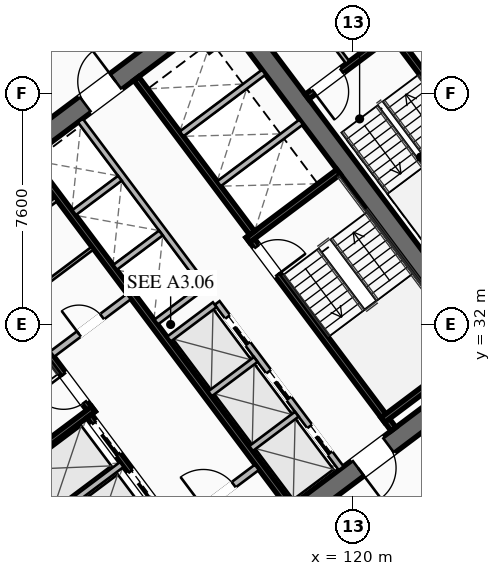
"""IFC4 building model, lengths in metres.
Left out: names, types, materials, properties, quantities, classifications, styles, units other than length and angle.
Written with IfcOpenShell. Run it as: python <this file> out.ifc"""

import sys

from ifc_helpers import new_model, si_unit, direction, frame, frame_2d, origin, place, context, subcontext, project, spatial, rectangle, extrude, element, fill, save


model = new_model("IFC4")
c1 = context("Model", 3, precision=1e-05, world=origin(), true_north=direction((0.0, 1.0)))
c2 = subcontext(c1, "Body", "Model", "MODEL_VIEW")
j1 = project(units=[si_unit("LENGTHUNIT", "METRE"), si_unit("PLANEANGLEUNIT", "RADIAN")], contexts=[c1])
p1 = place(None, origin())
s1 = spatial("IfcSite", under=j1, at=p1, CompositionType="ELEMENT")
p2 = place(p1, origin())
s2 = spatial("IfcBuilding", under=s1, at=p2, CompositionType="ELEMENT")
p3 = place(p2, frame((0.0, 0.0, 56.55)))
s3 = spatial("IfcBuildingStorey", under=s2, at=p3, CompositionType="ELEMENT", Elevation=56.55)
for number, where, z_axis, x_axis in (
    (1, (112.476, 21.107, 0.0), (0.0, 0.0, 1.0), (-0.6, 0.8, 0.0)),
    (2, (115.524, 42.893, 0.0), (0.0, 0.0, 1.0), (0.6, -0.8, 0.0)),
):
    element("IfcWall", number, at=place(p3, frame(where, z_axis=z_axis, x_axis=x_axis)), inside=s3, PredefinedType="SHEAR", context=c2, shape_type="SweptSolid", body=[
        extrude(rectangle(XDim=15.6, YDim=0.65, at=frame_2d((7.8, 0.0))), origin(), (0.0, 0.0, 1.0), 3.55),
    ])
p4 = place(p3, frame((124.429, 30.478, 0.0), z_axis=(0.0, 0.0, 1.0), x_axis=(-0.799998028465, -0.600002628705, 0.0)))
e3 = element("IfcWall", 3, at=p4, inside=s3, PredefinedType="SHEAR", context=c2, shape_type="SweptSolid", body=[
    extrude(rectangle(XDim=14.86, YDim=0.65, at=frame_2d((7.43, 0.0))), origin(), (0.0, 0.0, 1.0), 3.55),
])
p5 = place(p4, frame((9.13, 0.0, 0.0)))
e4 = element("IfcOpeningElement", 4, at=p5, cuts=e3, PredefinedType="OPENING", context=c2, shape_type="SweptSolid", body=[
    extrude(rectangle(XDim=1.25, YDim=2.25, at=frame_2d((0.625, 1.125))), frame((0.0, 0.335, 0.0), z_axis=(0.0, -1.0, 0.0), x_axis=(1.0, 0.0, 0.0)), (0.0, 0.0, 1.0), 0.67),
])
p6 = place(p4, frame((4.08, 0.0, 0.0)))
e5 = element("IfcOpeningElement", 5, at=p6, cuts=e3, PredefinedType="OPENING", context=c2, shape_type="SweptSolid", body=[
    extrude(rectangle(XDim=1.25, YDim=2.25, at=frame_2d((0.625, 1.125))), frame((0.0, 0.335, 0.0), z_axis=(0.0, -1.0, 0.0), x_axis=(1.0, 0.0, 0.0)), (0.0, 0.0, 1.0), 0.67),
])
p7 = place(p3, frame((103.571, 33.522, 0.0), z_axis=(0.0, 0.0, 1.0), x_axis=(0.799998028465, 0.600002628705, 0.0)))
e6 = element("IfcWall", 6, at=p7, inside=s3, PredefinedType="SHEAR", context=c2, shape_type="SweptSolid", body=[
    extrude(rectangle(XDim=14.86, YDim=0.65, at=frame_2d((7.43, 0.0))), origin(), (0.0, 0.0, 1.0), 3.55),
])
p8 = place(p7, frame((4.48, 0.0, 0.0)))
e7 = element("IfcOpeningElement", 7, at=p8, cuts=e6, PredefinedType="OPENING", context=c2, shape_type="SweptSolid", body=[
    extrude(rectangle(XDim=1.25, YDim=2.25, at=frame_2d((0.625, 1.125))), frame((0.0, 0.335, 0.0), z_axis=(0.0, -1.0, 0.0), x_axis=(1.0, 0.0, 0.0)), (0.0, 0.0, 1.0), 0.67),
])
p9 = place(p7, frame((9.53, 0.0, 0.0)))
e8 = element("IfcOpeningElement", 8, at=p9, cuts=e6, PredefinedType="OPENING", context=c2, shape_type="SweptSolid", body=[
    extrude(rectangle(XDim=1.25, YDim=2.25, at=frame_2d((0.625, 1.125))), frame((0.0, 0.335, 0.0), z_axis=(0.0, -1.0, 0.0), x_axis=(1.0, 0.0, 0.0)), (0.0, 0.0, 1.0), 0.67),
])
p10 = place(p3, frame((111.44, 29.08, 0.0), z_axis=(0.0, 0.0, 1.0), x_axis=(-0.600009827119, 0.799992629566, 0.0)))
e9 = element("IfcWall", 9, at=p10, inside=s3, PredefinedType="SHEAR", context=c2, shape_type="SweptSolid", body=[
    extrude(rectangle(XDim=7.95, YDim=0.2, at=frame_2d((3.975, 0.0))), origin(), (0.0, 0.0, 1.0), 3.35),
])
p11 = place(p10, frame((0.45, 0.0, 0.0)))
e10 = element("IfcOpeningElement", 10, at=p11, cuts=e9, PredefinedType="OPENING", context=c2, shape_type="SweptSolid", body=[
    extrude(rectangle(XDim=1.15, YDim=2.2, at=frame_2d((0.575, 1.1))), frame((0.0, 0.11, 0.0), z_axis=(0.0, -1.0, 0.0), x_axis=(1.0, 0.0, 0.0)), (0.0, 0.0, 1.0), 0.22),
])
p12 = place(p3, frame((108.476, 26.982, 0.0), z_axis=(0.0, 0.0, 1.0), x_axis=(0.799984290658, 0.600020945218, 0.0)))
e11 = element("IfcWall", 11, at=p12, inside=s3, PredefinedType="SHEAR", context=c2, shape_type="SweptSolid", body=[
    extrude(rectangle(XDim=3.73, YDim=0.2, at=frame_2d((1.865, 0.0))), origin(), (0.0, 0.0, 1.0), 3.35),
])
p13 = place(p3, frame((116.56, 34.92, 0.0), z_axis=(0.0, 0.0, 1.0), x_axis=(0.600009827119, -0.799992629566, 0.0)))
e12 = element("IfcWall", 12, at=p13, inside=s3, PredefinedType="SHEAR", context=c2, shape_type="SweptSolid", body=[
    extrude(rectangle(XDim=7.95, YDim=0.2, at=frame_2d((3.975, 0.0))), origin(), (0.0, 0.0, 1.0), 3.35),
])
p14 = place(p13, frame((0.45, 0.0, 0.0)))
e13 = element("IfcOpeningElement", 13, at=p14, cuts=e12, PredefinedType="OPENING", context=c2, shape_type="SweptSolid", body=[
    extrude(rectangle(XDim=1.15, YDim=2.2, at=frame_2d((0.575, 1.1))), frame((0.0, 0.11, 0.0), z_axis=(0.0, -1.0, 0.0), x_axis=(1.0, 0.0, 0.0)), (0.0, 0.0, 1.0), 0.22),
])
for number, where, z_axis, x_axis in (
    (14, (116.54, 34.78, 0.0), (0.0, 0.0, 1.0), (0.8, 0.6, 0.0)),
    (15, (120.98, 28.86, 0.0), (0.0, 0.0, 1.0), (0.8, 0.6, 0.0)),
):
    element("IfcWall", number, at=place(p3, frame(where, z_axis=z_axis, x_axis=x_axis)), inside=s3, PredefinedType="SHEAR", context=c2, shape_type="SweptSolid", body=[
        extrude(rectangle(XDim=3.73, YDim=0.2, at=frame_2d((1.865, 0.0))), origin(), (0.0, 0.0, 1.0), 3.35),
    ])
p15 = place(p3, frame((117.938, 26.016, 0.0), z_axis=(0.0, 0.0, 1.0), x_axis=(-0.600005463273, 0.799995902516, 0.0)))
e16 = element("IfcWall", 16, at=p15, inside=s3, PredefinedType="SHEAR", context=c2, shape_type="SweptSolid", body=[
    extrude(rectangle(XDim=14.3, YDim=0.2, at=frame_2d((7.15, 0.0))), origin(), (0.0, 0.0, 1.0), 3.35),
])
p16 = place(p3, frame((110.104, 31.028, 0.0), z_axis=(0.0, 0.0, 1.0), x_axis=(0.800018601094, 0.59997519774, 0.0)))
e17 = element("IfcWall", 17, at=p16, inside=s3, PredefinedType="SOLIDWALL", context=c2, shape_type="SweptSolid", body=[
    extrude(rectangle(XDim=3.15, YDim=0.22, at=frame_2d((1.575, 0.0))), origin(), (0.0, 0.0, 1.0), 2.703),
])
p17 = place(p16, frame((1.1, 0.0, 0.0)))
e18 = element("IfcOpeningElement", 18, at=p17, cuts=e17, PredefinedType="OPENING", context=c2, shape_type="SweptSolid", body=[
    extrude(rectangle(XDim=0.95, YDim=2.05, at=frame_2d((0.475, 1.025))), frame((0.0, 0.12, 0.0), z_axis=(0.0, -1.0, 0.0), x_axis=(1.0, 0.0, 0.0)), (0.0, 0.0, 1.0), 0.24),
])
p18 = place(p3, frame((114.316, 25.412, 0.0), z_axis=(0.0, 0.0, 1.0), x_axis=(0.800018601094, 0.59997519774, 0.0)))
e19 = element("IfcWall", 19, at=p18, inside=s3, PredefinedType="SOLIDWALL", context=c2, shape_type="SweptSolid", body=[
    extrude(rectangle(XDim=3.15, YDim=0.22, at=frame_2d((1.575, 0.0))), origin(), (0.0, 0.0, 1.0), 2.703),
])
p19 = place(p18, frame((0.95, 0.0, 0.0)))
e20 = element("IfcOpeningElement", 20, at=p19, cuts=e19, PredefinedType="OPENING", context=c2, shape_type="SweptSolid", body=[
    extrude(rectangle(XDim=1.25, YDim=2.25, at=frame_2d((0.625, 1.125))), frame((0.0, 0.12, 0.0), z_axis=(0.0, -1.0, 0.0), x_axis=(1.0, 0.0, 0.0)), (0.0, 0.0, 1.0), 0.24),
])
p20 = place(p3, frame((115.13, 23.91, 0.0), z_axis=(0.0, 0.0, 1.0), x_axis=(-0.599975393228, 0.800018454488, 0.0)))
e21 = element("IfcWall", 21, at=p20, inside=s3, PredefinedType="SHEAR", context=c2, shape_type="SweptSolid", body=[
    extrude(rectangle(XDim=6.35, YDim=0.2, at=frame_2d((3.175, 0.0))), origin(), (0.0, 0.0, 1.0), 3.35),
])
p21 = place(p20, frame((4.775, 0.0, 0.0)))
e22 = element("IfcOpeningElement", 22, at=p21, cuts=e21, PredefinedType="OPENING", context=c2, shape_type="SweptSolid", body=[
    extrude(rectangle(XDim=1.3, YDim=2.25, at=frame_2d((0.65, 1.125))), frame((0.0, 0.11, 0.0), z_axis=(0.0, -1.0, 0.0), x_axis=(1.0, 0.0, 0.0)), (0.0, 0.0, 1.0), 0.22),
])
p22 = place(p20, frame((2.775, 0.0, 0.0)))
e23 = element("IfcOpeningElement", 23, at=p22, cuts=e21, PredefinedType="OPENING", context=c2, shape_type="SweptSolid", body=[
    extrude(rectangle(XDim=1.3, YDim=2.25, at=frame_2d((0.65, 1.125))), frame((0.0, 0.11, 0.0), z_axis=(0.0, -1.0, 0.0), x_axis=(1.0, 0.0, 0.0)), (0.0, 0.0, 1.0), 0.22),
])
p23 = place(p20, frame((0.575, 0.0, 0.0)))
e24 = element("IfcOpeningElement", 24, at=p23, cuts=e21, PredefinedType="OPENING", context=c2, shape_type="SweptSolid", body=[
    extrude(rectangle(XDim=1.3, YDim=2.25, at=frame_2d((0.65, 1.125))), frame((0.0, 0.11, 0.0), z_axis=(0.0, -1.0, 0.0), x_axis=(1.0, 0.0, 0.0)), (0.0, 0.0, 1.0), 0.22),
])
p24 = place(p3, frame((109.688, 25.366, 0.0), z_axis=(0.0, 0.0, 1.0), x_axis=(0.8, 0.6, 0.0)))
e25 = element("IfcWall", 25, at=p24, inside=s3, PredefinedType="SOLIDWALL", context=c2, shape_type="SweptSolid", body=[
    extrude(rectangle(XDim=3.38, YDim=0.2, at=frame_2d((1.69, 0.0))), origin(), (0.0, 0.0, 1.0), 3.35),
])
p25 = place(p3, frame((112.87, 40.09, 0.0), z_axis=(0.0, 0.0, 1.0), x_axis=(0.599975393228, -0.800018454488, 0.0)))
e26 = element("IfcWall", 26, at=p25, inside=s3, PredefinedType="SHEAR", context=c2, shape_type="SweptSolid", body=[
    extrude(rectangle(XDim=6.35, YDim=0.2, at=frame_2d((3.175, 0.0))), origin(), (0.0, 0.0, 1.0), 3.35),
])
for number, where, z_axis, x_axis in (
    (27, (115.59, 36.63, 0.0), (0.0, 0.0, 1.0), (0.8, 0.6, 0.0)),
    (28, (114.36, 38.27, 0.0), (0.0, 0.0, 1.0), (0.8, 0.6, 0.0)),
):
    element("IfcWall", number, at=place(p3, frame(where, z_axis=z_axis, x_axis=x_axis)), inside=s3, PredefinedType="SOLIDWALL", context=c2, shape_type="SweptSolid", body=[
        extrude(rectangle(XDim=3.38, YDim=0.2, at=frame_2d((1.69, 0.0))), origin(), (0.0, 0.0, 1.0), 3.35),
    ])
p26 = place(p3, frame((107.71, 34.22, 0.0), z_axis=(0.0, 0.0, 1.0), x_axis=(0.799981399002, 0.60002480053, 0.0)))
e29 = element("IfcWall", 29, at=p26, inside=s3, PredefinedType="PARTITIONING", context=c2, shape_type="SweptSolid", body=[
    extrude(rectangle(XDim=3.15, YDim=0.135, at=frame_2d((1.575, 0.0))), origin(), (0.0, 0.0, 1.0), 2.703),
])
p27 = place(p26, frame((1.05, 0.0, 0.0)))
e30 = element("IfcOpeningElement", 30, at=p27, cuts=e29, PredefinedType="OPENING", context=c2, shape_type="SweptSolid", body=[
    extrude(rectangle(XDim=1.05, YDim=2.2, at=frame_2d((0.525, 1.1))), frame((0.0, 0.077, 0.0), z_axis=(0.0, -1.0, 0.0), x_axis=(1.0, 0.0, 0.0)), (0.0, 0.0, 1.0), 0.155),
])
p28 = place(p3, frame((108.91, 32.62, 0.0), z_axis=(0.0, 0.0, 1.0), x_axis=(0.800018601094, 0.59997519774, 0.0)))
e31 = element("IfcWall", 31, at=p28, inside=s3, PredefinedType="PARTITIONING", context=c2, shape_type="SweptSolid", body=[
    extrude(rectangle(XDim=3.15, YDim=0.11, at=frame_2d((1.575, 0.0))), origin(), (0.0, 0.0, 1.0), 2.703),
])
p29 = place(p3, frame((119.61, 27.27, 0.0), z_axis=(0.0, 0.0, 1.0), x_axis=(-0.600011488909, 0.79999138319, 0.0)))
e32 = element("IfcWall", 32, at=p29, inside=s3, PredefinedType="SOLIDWALL", context=c2, shape_type="SweptSolid", body=[
    extrude(rectangle(XDim=6.8, YDim=0.2, at=frame_2d((3.4, 0.0))), origin(), (0.0, 0.0, 1.0), 3.35),
])
p30 = place(p29, frame((0.625, 0.0, 0.0)))
e33 = element("IfcOpeningElement", 33, at=p30, cuts=e32, PredefinedType="OPENING", context=c2, shape_type="SweptSolid", body=[
    extrude(rectangle(XDim=1.1, YDim=2.2, at=frame_2d((0.55, 1.1))), frame((0.0, 0.11, 0.0), z_axis=(0.0, -1.0, 0.0), x_axis=(1.0, 0.0, 0.0)), (0.0, 0.0, 1.0), 0.22),
])
p31 = place(p29, frame((2.875, 0.0, 0.0)))
e34 = element("IfcOpeningElement", 34, at=p31, cuts=e32, PredefinedType="OPENING", context=c2, shape_type="SweptSolid", body=[
    extrude(rectangle(XDim=1.1, YDim=2.2, at=frame_2d((0.55, 1.1))), frame((0.0, 0.11, 0.0), z_axis=(0.0, -1.0, 0.0), x_axis=(1.0, 0.0, 0.0)), (0.0, 0.0, 1.0), 0.22),
])
p32 = place(p29, frame((5.125, 0.0, 0.0)))
e35 = element("IfcOpeningElement", 35, at=p32, cuts=e32, PredefinedType="OPENING", context=c2, shape_type="SweptSolid", body=[
    extrude(rectangle(XDim=1.1, YDim=2.2, at=frame_2d((0.55, 1.1))), frame((0.0, 0.11, 0.0), z_axis=(0.0, -1.0, 0.0), x_axis=(1.0, 0.0, 0.0)), (0.0, 0.0, 1.0), 0.22),
])
p33 = place(p3, frame((116.646, 27.922, 0.0), z_axis=(0.0, 0.0, 1.0), x_axis=(0.8, 0.6, 0.0)))
e36 = element("IfcWall", 36, at=p33, inside=s3, PredefinedType="SOLIDWALL", context=c2, shape_type="SweptSolid", body=[
    extrude(rectangle(XDim=1.88, YDim=0.2, at=frame_2d((0.94, 0.0))), origin(), (0.0, 0.0, 1.0), 3.35),
])
p34 = place(p3, frame((115.296, 29.722, 0.0), z_axis=(0.0, 0.0, 1.0), x_axis=(0.799984418148, 0.600020775241, 0.0)))
e37 = element("IfcWall", 37, at=p34, inside=s3, PredefinedType="SOLIDWALL", context=c2, shape_type="SweptSolid", body=[
    extrude(rectangle(XDim=1.88, YDim=0.2, at=frame_2d((0.94, 0.0))), origin(), (0.0, 0.0, 1.0), 3.35),
])
p35 = place(p3, frame((113.946, 31.522, 0.0), z_axis=(0.0, 0.0, 1.0), x_axis=(0.8, 0.6, 0.0)))
e38 = element("IfcWall", 38, at=p35, inside=s3, PredefinedType="SOLIDWALL", context=c2, shape_type="SweptSolid", body=[
    extrude(rectangle(XDim=1.88, YDim=0.2, at=frame_2d((0.94, 0.0))), origin(), (0.0, 0.0, 1.0), 3.35),
])
p36 = place(p3, frame((115.11, 33.27, 0.0), z_axis=(0.0, 0.0, 1.0), x_axis=(-0.600011488909, 0.79999138319, 0.0)))
e39 = element("IfcWall", 39, at=p36, inside=s3, PredefinedType="SOLIDWALL", context=c2, shape_type="SweptSolid", body=[
    extrude(rectangle(XDim=6.8, YDim=0.2, at=frame_2d((3.4, 0.0))), origin(), (0.0, 0.0, 1.0), 3.35),
])
p37 = place(p3, frame((113.526, 32.082, 0.0), z_axis=(0.0, 0.0, 1.0), x_axis=(0.800046745961, 0.599937666993, 0.0)))
e40 = element("IfcWall", 40, at=p37, inside=s3, PredefinedType="SOLIDWALL", context=c2, shape_type="SweptSolid", body=[
    extrude(rectangle(XDim=1.88, YDim=0.2, at=frame_2d((0.94, 0.0))), origin(), (0.0, 0.0, 1.0), 3.35),
])
p38 = place(p3, frame((112.176, 33.882, 0.0), z_axis=(0.0, 0.0, 1.0), x_axis=(0.8, 0.6, 0.0)))
e41 = element("IfcWall", 41, at=p38, inside=s3, PredefinedType="SOLIDWALL", context=c2, shape_type="SweptSolid", body=[
    extrude(rectangle(XDim=1.88, YDim=0.2, at=frame_2d((0.94, 0.0))), origin(), (0.0, 0.0, 1.0), 3.35),
])
p39 = place(p3, frame((110.826, 35.682, 0.0), z_axis=(0.0, 0.0, 1.0), x_axis=(0.799984418148, 0.600020775241, 0.0)))
e42 = element("IfcWall", 42, at=p39, inside=s3, PredefinedType="SOLIDWALL", context=c2, shape_type="SweptSolid", body=[
    extrude(rectangle(XDim=1.88, YDim=0.2, at=frame_2d((0.94, 0.0))), origin(), (0.0, 0.0, 1.0), 3.35),
])
p40 = place(p3, frame((125.304, 36.228, 0.0), z_axis=(0.0, 0.0, 1.0), x_axis=(-0.59998851072, 0.800008616831, 0.0)))
e43 = element("IfcWall", 43, at=p40, inside=s3, PredefinedType="SHEAR", context=c2, shape_type="SweptSolid", body=[
    extrude(rectangle(XDim=6.8, YDim=0.2, at=frame_2d((3.4, 0.0))), origin(), (0.0, 0.0, 1.0), 3.35),
])
p41 = place(p3, frame((121.204, 41.528, 0.0), z_axis=(0.0, 0.0, 1.0), x_axis=(-0.800017232136, -0.599977023131, 0.0)))
e44 = element("IfcWall", 44, at=p41, inside=s3, PredefinedType="SHEAR", context=c2, shape_type="SweptSolid", body=[
    extrude(rectangle(XDim=3.4, YDim=0.2, at=frame_2d((1.7, 0.0))), origin(), (0.0, 0.0, 1.0), 3.35),
])
p42 = place(p41, frame((1.975, 0.0, 0.0)))
e45 = element("IfcOpeningElement", 45, at=p42, cuts=e44, PredefinedType="OPENING", context=c2, shape_type="SweptSolid", body=[
    extrude(rectangle(XDim=1.15, YDim=2.2, at=frame_2d((0.575, 1.1))), frame((0.0, 0.11, 0.0), z_axis=(0.0, -1.0, 0.0), x_axis=(1.0, 0.0, 0.0)), (0.0, 0.0, 1.0), 0.22),
])
p43 = place(p3, frame((119.824, 40.618, 0.0), z_axis=(0.0, 0.0, 1.0), x_axis=(-0.599982243973, 0.800013316712, 0.0)))
e46 = element("IfcWall", 46, at=p43, inside=s3, PredefinedType="PARTITIONING", context=c2, shape_type="SweptSolid", body=[
    extrude(rectangle(XDim=4.4, YDim=0.135, at=frame_2d((2.2, 0.0))), origin(), (0.0, 0.0, 1.0), 2.703),
])
p44 = place(p3, frame((98.174, 34.468, 0.0), z_axis=(0.0, 0.0, 1.0), x_axis=(0.800000982127, 0.599998690494, 0.0)))
e47 = element("IfcWall", 47, at=p44, inside=s3, PredefinedType="PARTITIONING", context=c2, shape_type="SweptSolid", body=[
    extrude(rectangle(XDim=29.83, YDim=0.135, at=frame_2d((14.915, 0.0))), origin(), (0.0, 0.0, 1.0), 2.703),
])
p45 = place(p44, frame((0.3, 0.0, 0.0)))
e48 = element("IfcOpeningElement", 48, at=p45, cuts=e47, PredefinedType="OPENING", context=c2, shape_type="SweptSolid", body=[
    extrude(rectangle(XDim=0.95, YDim=2.05, at=frame_2d((0.475, 1.025))), frame((0.0, 0.077, 0.0), z_axis=(0.0, -1.0, 0.0), x_axis=(1.0, 0.0, 0.0)), (0.0, 0.0, 1.0), 0.155),
])
p46 = place(p44, frame((10.913, 0.0, 0.0)))
e49 = element("IfcOpeningElement", 49, at=p46, cuts=e47, PredefinedType="OPENING", context=c2, shape_type="SweptSolid", body=[
    extrude(rectangle(XDim=0.95, YDim=2.05, at=frame_2d((0.475, 1.025))), frame((0.0, 0.077, 0.0), z_axis=(0.0, -1.0, 0.0), x_axis=(1.0, 0.0, 0.0)), (0.0, 0.0, 1.0), 0.155),
])
p47 = place(p44, frame((28.58, 0.0, 0.0)))
e50 = element("IfcOpeningElement", 50, at=p47, cuts=e47, PredefinedType="OPENING", context=c2, shape_type="SweptSolid", body=[
    extrude(rectangle(XDim=0.95, YDim=2.05, at=frame_2d((0.475, 1.025))), frame((0.0, 0.077, 0.0), z_axis=(0.0, -1.0, 0.0), x_axis=(1.0, 0.0, 0.0)), (0.0, 0.0, 1.0), 0.155),
])
p48 = place(p3, frame((135.46, 34.47, 0.0), z_axis=(0.0, 0.0, 1.0), x_axis=(-0.800000982127, -0.599998690494, 0.0)))
e51 = element("IfcWall", 51, at=p48, inside=s3, PredefinedType="PARTITIONING", context=c2, shape_type="SweptSolid", body=[
    extrude(rectangle(XDim=29.83, YDim=0.135, at=frame_2d((14.915, 0.0))), origin(), (0.0, 0.0, 1.0), 2.703),
])
p49 = place(p48, frame((28.5, 0.0, 0.0)))
e52 = element("IfcOpeningElement", 52, at=p49, cuts=e51, PredefinedType="OPENING", context=c2, shape_type="SweptSolid", body=[
    extrude(rectangle(XDim=0.95, YDim=2.05, at=frame_2d((0.475, 1.025))), frame((0.0, 0.077, 0.0), z_axis=(0.0, -1.0, 0.0), x_axis=(1.0, 0.0, 0.0)), (0.0, 0.0, 1.0), 0.155),
])
p50 = place(p48, frame((17.938, 0.0, 0.0)))
e53 = element("IfcOpeningElement", 53, at=p50, cuts=e51, PredefinedType="OPENING", context=c2, shape_type="SweptSolid", body=[
    extrude(rectangle(XDim=0.95, YDim=2.05, at=frame_2d((0.475, 1.025))), frame((0.0, 0.077, 0.0), z_axis=(0.0, -1.0, 0.0), x_axis=(1.0, 0.0, 0.0)), (0.0, 0.0, 1.0), 0.155),
])
p51 = place(p48, frame((0.38, 0.0, 0.0)))
e54 = element("IfcOpeningElement", 54, at=p51, cuts=e51, PredefinedType="OPENING", context=c2, shape_type="SweptSolid", body=[
    extrude(rectangle(XDim=0.95, YDim=2.05, at=frame_2d((0.475, 1.025))), frame((0.0, 0.077, 0.0), z_axis=(0.0, -1.0, 0.0), x_axis=(1.0, 0.0, 0.0)), (0.0, 0.0, 1.0), 0.155),
])
p52 = place(p3, frame((111.548, 16.636, 0.0), z_axis=(0.0, 0.0, 1.0), x_axis=(-0.600003517529, 0.799997361841, 0.0)))
e55 = element("IfcWall", 55, at=p52, inside=s3, PredefinedType="PARTITIONING", context=c2, shape_type="SweptSolid", body=[
    extrude(rectangle(XDim=22.21, YDim=0.135, at=frame_2d((11.105, 0.0))), origin(), (0.0, 0.0, 1.0), 2.703),
])
p53 = place(p52, frame((20.96, 0.0, 0.0)))
e56 = element("IfcOpeningElement", 56, at=p53, cuts=e55, PredefinedType="OPENING", context=c2, shape_type="SweptSolid", body=[
    extrude(rectangle(XDim=0.95, YDim=2.05, at=frame_2d((0.475, 1.025))), frame((0.0, 0.077, 0.0), z_axis=(0.0, -1.0, 0.0), x_axis=(1.0, 0.0, 0.0)), (0.0, 0.0, 1.0), 0.155),
])
p54 = place(p9, origin())
e57 = element("IfcDoor", 57, at=p54, inside=s3, OperationType="SINGLE_SWING_RIGHT", PredefinedType="DOOR", context=c2, shape_type="SweptSolid", body=[
    extrude(rectangle(XDim=1.25, YDim=2.25, at=frame_2d((0.625, 1.125))), frame((0.0, 0.025, 0.0), z_axis=(0.0, -1.0, 0.0), x_axis=(1.0, 0.0, 0.0)), (0.0, 0.0, 1.0), 0.05),
])
fill(e8, e57)
p55 = place(p6, origin())
e58 = element("IfcDoor", 58, at=p55, inside=s3, OperationType="SINGLE_SWING_RIGHT", PredefinedType="DOOR", context=c2, shape_type="SweptSolid", body=[
    extrude(rectangle(XDim=1.25, YDim=2.25, at=frame_2d((0.625, 1.125))), frame((0.0, 0.025, 0.0), z_axis=(0.0, -1.0, 0.0), x_axis=(1.0, 0.0, 0.0)), (0.0, 0.0, 1.0), 0.05),
])
fill(e5, e58)
p56 = place(p11, origin())
e59 = element("IfcDoor", 59, at=p56, inside=s3, OperationType="SINGLE_SWING_RIGHT", PredefinedType="DOOR", context=c2, shape_type="SweptSolid", body=[
    extrude(rectangle(XDim=1.15, YDim=2.2, at=frame_2d((0.575, 1.1))), frame((0.0, 0.025, 0.0), z_axis=(0.0, -1.0, 0.0), x_axis=(1.0, 0.0, 0.0)), (0.0, 0.0, 1.0), 0.05),
])
fill(e10, e59)
p57 = place(p14, origin())
e60 = element("IfcDoor", 60, at=p57, inside=s3, OperationType="SINGLE_SWING_RIGHT", PredefinedType="DOOR", context=c2, shape_type="SweptSolid", body=[
    extrude(rectangle(XDim=1.15, YDim=2.2, at=frame_2d((0.575, 1.1))), frame((0.0, 0.025, 0.0), z_axis=(0.0, -1.0, 0.0), x_axis=(1.0, 0.0, 0.0)), (0.0, 0.0, 1.0), 0.05),
])
fill(e13, e60)
p58 = place(p19, origin())
e61 = element("IfcDoor", 61, at=p58, inside=s3, OperationType="SINGLE_SWING_LEFT", PredefinedType="DOOR", context=c2, shape_type="SweptSolid", body=[
    extrude(rectangle(XDim=1.25, YDim=2.25, at=frame_2d((0.625, 1.125))), frame((0.0, 0.025, 0.0), z_axis=(0.0, -1.0, 0.0), x_axis=(1.0, 0.0, 0.0)), (0.0, 0.0, 1.0), 0.05),
])
fill(e20, e61)
p59 = place(p17, origin())
e62 = element("IfcDoor", 62, at=p59, inside=s3, OperationType="SINGLE_SWING_LEFT", PredefinedType="DOOR", context=c2, shape_type="SweptSolid", body=[
    extrude(rectangle(XDim=0.95, YDim=2.05, at=frame_2d((0.475, 1.025))), frame((0.0, 0.025, 0.0), z_axis=(0.0, -1.0, 0.0), x_axis=(1.0, 0.0, 0.0)), (0.0, 0.0, 1.0), 0.05),
])
fill(e18, e62)
p60 = place(p42, origin())
e63 = element("IfcDoor", 63, at=p60, inside=s3, OperationType="SINGLE_SWING_RIGHT", PredefinedType="DOOR", context=c2, shape_type="SweptSolid", body=[
    extrude(rectangle(XDim=1.15, YDim=2.2, at=frame_2d((0.575, 1.1))), frame((0.0, 0.025, 0.0), z_axis=(0.0, -1.0, 0.0), x_axis=(1.0, 0.0, 0.0)), (0.0, 0.0, 1.0), 0.05),
])
fill(e45, e63)
p61 = place(p21, origin())
e64 = element("IfcDoor", 64, at=p61, inside=s3, OperationType="SLIDING_TO_LEFT", PredefinedType="DOOR", context=c2, shape_type="SweptSolid", body=[
    extrude(rectangle(XDim=1.3, YDim=2.25, at=frame_2d((0.65, 1.125))), frame((0.0, 0.025, 0.0), z_axis=(0.0, -1.0, 0.0), x_axis=(1.0, 0.0, 0.0)), (0.0, 0.0, 1.0), 0.05),
])
fill(e22, e64)
p62 = place(p22, origin())
e65 = element("IfcDoor", 65, at=p62, inside=s3, OperationType="SLIDING_TO_LEFT", PredefinedType="DOOR", context=c2, shape_type="SweptSolid", body=[
    extrude(rectangle(XDim=1.3, YDim=2.25, at=frame_2d((0.65, 1.125))), frame((0.0, 0.025, 0.0), z_axis=(0.0, -1.0, 0.0), x_axis=(1.0, 0.0, 0.0)), (0.0, 0.0, 1.0), 0.05),
])
fill(e23, e65)
p63 = place(p30, origin())
e66 = element("IfcDoor", 66, at=p63, inside=s3, OperationType="SLIDING_TO_LEFT", PredefinedType="DOOR", context=c2, shape_type="SweptSolid", body=[
    extrude(rectangle(XDim=1.1, YDim=2.2, at=frame_2d((0.55, 1.1))), frame((0.0, 0.025, 0.0), z_axis=(0.0, -1.0, 0.0), x_axis=(1.0, 0.0, 0.0)), (0.0, 0.0, 1.0), 0.05),
])
fill(e33, e66)
p64 = place(p31, origin())
e67 = element("IfcDoor", 67, at=p64, inside=s3, OperationType="SLIDING_TO_LEFT", PredefinedType="DOOR", context=c2, shape_type="SweptSolid", body=[
    extrude(rectangle(XDim=1.1, YDim=2.2, at=frame_2d((0.55, 1.1))), frame((0.0, 0.025, 0.0), z_axis=(0.0, -1.0, 0.0), x_axis=(1.0, 0.0, 0.0)), (0.0, 0.0, 1.0), 0.05),
])
fill(e34, e67)
p65 = place(p32, origin())
e68 = element("IfcDoor", 68, at=p65, inside=s3, OperationType="SLIDING_TO_LEFT", PredefinedType="DOOR", context=c2, shape_type="SweptSolid", body=[
    extrude(rectangle(XDim=1.1, YDim=2.2, at=frame_2d((0.55, 1.1))), frame((0.0, 0.025, 0.0), z_axis=(0.0, -1.0, 0.0), x_axis=(1.0, 0.0, 0.0)), (0.0, 0.0, 1.0), 0.05),
])
fill(e35, e68)
save(model, sys.argv[1])
